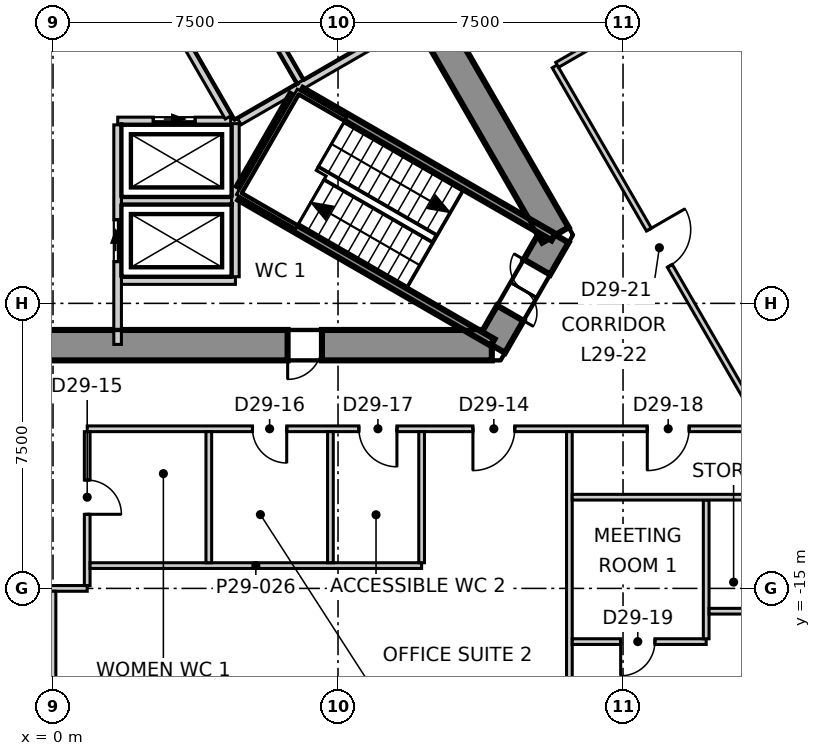
"""IFC4 building model, lengths in metres.
Left out: names, types, materials, properties, quantities, classifications, styles, units other than length and angle.
Written with IfcOpenShell. Run it as: python <this file> out.ifc"""

import sys

from ifc_helpers import new_model, si_unit, direction, frame, frame_2d, origin, place, context, subcontext, project, spatial, polyline, rectangle, outline, extrude, element, fill, save


model = new_model("IFC4")
c1 = context("Model", 3, precision=1e-05, world=origin(), true_north=direction((0.0, 1.0)))
c2 = subcontext(c1, "Body", "Model", "MODEL_VIEW")
j1 = project(units=[si_unit("LENGTHUNIT", "METRE"), si_unit("PLANEANGLEUNIT", "RADIAN")], contexts=[c1])
p1 = place(None, origin())
s1 = spatial("IfcSite", under=j1, at=p1, CompositionType="ELEMENT")
p2 = place(p1, origin())
s2 = spatial("IfcBuilding", under=s1, at=p2, CompositionType="ELEMENT")
p3 = place(p2, frame((0.0, 0.0, 128.3)))
s3 = spatial("IfcBuildingStorey", under=s2, at=p3, CompositionType="ELEMENT", Elevation=128.3)
p4 = place(p3, frame((-11.547, -8.6, -0.3), z_axis=(0.0, 0.0, 1.0), x_axis=(1.0, 0.0, 0.0)))
e1 = element("IfcWall", 1, at=p4, inside=s3, PredefinedType="SHEAR", context=c2, shape_type="SweptSolid", body=[
    extrude(outline(polyline([(-0.231, -0.4), (1.732, -0.4), (3.695, -0.4), (5.658, -0.4), (7.621, -0.4), (9.584, -0.4), (11.547, -0.4), (13.51, -0.4), (15.473, -0.4), (17.436, -0.4), (19.399, -0.4), (21.362, -0.4), (23.325, -0.4), (22.863, 0.4), (20.977, 0.4), (19.091, 0.4), (17.205, 0.4), (15.319, 0.4), (13.433, 0.4), (11.547, 0.4), (9.661, 0.4), (7.775, 0.4), (5.889, 0.4), (4.003, 0.4), (2.117, 0.4), (0.231, 0.4), (-0.231, -0.4)])), origin(), (0.0, 0.0, 1.0), 4.0),
])
p5 = place(p4, frame((3.951, 0.0, 0.3)))
e2 = element("IfcOpeningElement", 2, at=p5, cuts=e1, PredefinedType="OPENING", context=c2, shape_type="SweptSolid", body=[
    extrude(rectangle(XDim=1.0, YDim=2.1, at=frame_2d((0.5, 1.05))), frame((0.0, 0.41, 0.0), z_axis=(0.0, -1.0, 0.0), x_axis=(1.0, 0.0, 0.0)), (0.0, 0.0, 1.0), 0.82),
])
p6 = place(p4, frame((17.722, 0.0, 0.3)))
e3 = element("IfcOpeningElement", 3, at=p6, cuts=e1, PredefinedType="OPENING", context=c2, shape_type="SweptSolid", body=[
    extrude(rectangle(XDim=0.9, YDim=2.1, at=frame_2d((0.45, 1.05))), frame((0.0, 0.41, 0.0), z_axis=(0.0, -1.0, 0.0), x_axis=(1.0, 0.0, 0.0)), (0.0, 0.0, 1.0), 0.82),
])
p7 = place(p3, frame((11.547, -8.6, -0.3), z_axis=(0.0, 0.0, 1.0), x_axis=(0.49987182685, 0.866099391942, 0.0)))
e4 = element("IfcWall", 4, at=p7, inside=s3, PredefinedType="SHEAR", context=c2, shape_type="SweptSolid", body=[
    extrude(outline(polyline([(-0.231, -0.4), (1.674, -0.4), (3.579, -0.4), (3.118, 0.4), (1.674, 0.4), (0.231, 0.4), (-0.231, -0.4)])), origin(), (0.0, 0.0, 1.0), 4.0),
])
p8 = place(p7, frame((0.974, 0.0, 0.3)))
e5 = element("IfcOpeningElement", 5, at=p8, cuts=e4, PredefinedType="OPENING", context=c2, shape_type="SweptSolid", body=[
    extrude(rectangle(XDim=1.4, YDim=2.1, at=frame_2d((0.7, 1.05))), frame((0.0, 0.41, 0.0), z_axis=(0.0, -1.0, 0.0), x_axis=(1.0, 0.0, 0.0)), (0.0, 0.0, 1.0), 0.82),
])
p9 = place(p3, frame((13.221, -5.7, -0.3), z_axis=(0.0, 0.0, 1.0), x_axis=(-0.499995765644, 0.866027848477, 0.0)))
e6 = element("IfcWall", 6, at=p9, inside=s3, PredefinedType="SHEAR", context=c2, shape_type="SweptSolid", body=[
    extrude(outline(polyline([(-0.231, -0.4), (1.732, -0.4), (3.695, -0.4), (5.658, -0.4), (7.621, -0.4), (9.584, -0.4), (11.547, -0.4), (13.51, -0.4), (15.473, -0.4), (17.436, -0.4), (19.399, -0.4), (21.362, -0.4), (23.325, -0.4), (22.863, 0.4), (20.977, 0.4), (19.091, 0.4), (17.205, 0.4), (15.319, 0.4), (13.433, 0.4), (11.547, 0.4), (9.661, 0.4), (7.775, 0.4), (5.889, 0.4), (4.003, 0.4), (2.117, 0.4), (0.231, 0.4), (-0.231, -0.4)])), origin(), (0.0, 0.0, 1.0), 4.0),
])
p10 = place(p9, frame((10.647, 0.0, 0.3)))
e7 = element("IfcOpeningElement", 7, at=p10, cuts=e6, PredefinedType="OPENING", context=c2, shape_type="SweptSolid", body=[
    extrude(rectangle(XDim=1.8, YDim=2.1, at=frame_2d((0.9, 1.05))), frame((0.0, 0.41, 0.0), z_axis=(0.0, -1.0, 0.0), x_axis=(1.0, 0.0, 0.0)), (0.0, 0.0, 1.0), 0.82),
])
p11 = place(p9, frame((17.721, 0.0, 0.3)))
e8 = element("IfcOpeningElement", 8, at=p11, cuts=e6, PredefinedType="OPENING", context=c2, shape_type="SweptSolid", body=[
    extrude(rectangle(XDim=0.9, YDim=2.1, at=frame_2d((0.45, 1.05))), frame((0.0, 0.41, 0.0), z_axis=(0.0, -1.0, 0.0), x_axis=(1.0, 0.0, 0.0)), (0.0, 0.0, 1.0), 0.82),
])
p12 = place(p3, frame((31.588, -14.647, 0.0), z_axis=(0.0, 0.0, 1.0), x_axis=(-0.500005036527, 0.866022495925, 0.0)))
e9 = element("IfcWall", 9, at=p12, inside=s3, PredefinedType="ELEMENTEDWALL", context=c2, shape_type="SweptSolid", body=[
    extrude(rectangle(XDim=56.938, YDim=0.2, at=frame_2d((28.469, 0.0))), origin(), (0.0, 0.0, 1.0), 3.7),
])
p13 = place(p12, frame((2.25, 0.0, 0.9)))
e10 = element("IfcOpeningElement", 10, at=p13, cuts=e9, PredefinedType="OPENING", context=c2, shape_type="SweptSolid", body=[
    extrude(rectangle(XDim=4.9, YDim=2.5, at=frame_2d((2.45, 1.25))), frame((0.0, 0.11, 0.0), z_axis=(0.0, -1.0, 0.0), x_axis=(1.0, 0.0, 0.0)), (0.0, 0.0, 1.0), 0.22),
])
p14 = place(p12, frame((9.044, 0.0, 0.9)))
e11 = element("IfcOpeningElement", 11, at=p14, cuts=e9, PredefinedType="OPENING", context=c2, shape_type="SweptSolid", body=[
    extrude(rectangle(XDim=4.9, YDim=2.5, at=frame_2d((2.45, 1.25))), frame((0.0, 0.11, 0.0), z_axis=(0.0, -1.0, 0.0), x_axis=(1.0, 0.0, 0.0)), (0.0, 0.0, 1.0), 0.22),
])
p15 = place(p12, frame((15.838, 0.0, 0.9)))
e12 = element("IfcOpeningElement", 12, at=p15, cuts=e9, PredefinedType="OPENING", context=c2, shape_type="SweptSolid", body=[
    extrude(rectangle(XDim=4.9, YDim=2.5, at=frame_2d((2.45, 1.25))), frame((0.0, 0.11, 0.0), z_axis=(0.0, -1.0, 0.0), x_axis=(1.0, 0.0, 0.0)), (0.0, 0.0, 1.0), 0.22),
])
p16 = place(p12, frame((22.632, 0.0, 0.9)))
e13 = element("IfcOpeningElement", 13, at=p16, cuts=e9, PredefinedType="OPENING", context=c2, shape_type="SweptSolid", body=[
    extrude(rectangle(XDim=4.9, YDim=2.5, at=frame_2d((2.45, 1.25))), frame((0.0, 0.11, 0.0), z_axis=(0.0, -1.0, 0.0), x_axis=(1.0, 0.0, 0.0)), (0.0, 0.0, 1.0), 0.22),
])
p17 = place(p12, frame((29.426, 0.0, 0.9)))
e14 = element("IfcOpeningElement", 14, at=p17, cuts=e9, PredefinedType="OPENING", context=c2, shape_type="SweptSolid", body=[
    extrude(rectangle(XDim=4.9, YDim=2.5, at=frame_2d((2.45, 1.25))), frame((0.0, 0.11, 0.0), z_axis=(0.0, -1.0, 0.0), x_axis=(1.0, 0.0, 0.0)), (0.0, 0.0, 1.0), 0.22),
])
p18 = place(p12, frame((36.22, 0.0, 0.9)))
e15 = element("IfcOpeningElement", 15, at=p18, cuts=e9, PredefinedType="OPENING", context=c2, shape_type="SweptSolid", body=[
    extrude(rectangle(XDim=4.9, YDim=2.5, at=frame_2d((2.45, 1.25))), frame((0.0, 0.11, 0.0), z_axis=(0.0, -1.0, 0.0), x_axis=(1.0, 0.0, 0.0)), (0.0, 0.0, 1.0), 0.22),
])
p19 = place(p12, frame((43.014, 0.0, 0.9)))
e16 = element("IfcOpeningElement", 16, at=p19, cuts=e9, PredefinedType="OPENING", context=c2, shape_type="SweptSolid", body=[
    extrude(rectangle(XDim=4.9, YDim=2.5, at=frame_2d((2.45, 1.25))), frame((0.0, 0.11, 0.0), z_axis=(0.0, -1.0, 0.0), x_axis=(1.0, 0.0, 0.0)), (0.0, 0.0, 1.0), 0.22),
])
p20 = place(p12, frame((49.808, 0.0, 0.9)))
e17 = element("IfcOpeningElement", 17, at=p20, cuts=e9, PredefinedType="OPENING", context=c2, shape_type="SweptSolid", body=[
    extrude(rectangle(XDim=4.9, YDim=2.5, at=frame_2d((2.45, 1.25))), frame((0.0, 0.11, 0.0), z_axis=(0.0, -1.0, 0.0), x_axis=(1.0, 0.0, 0.0)), (0.0, 0.0, 1.0), 0.22),
])
p21 = place(p3, frame((0.901, -10.8, 0.0), z_axis=(0.0, 0.0, 1.0), x_axis=(1.0, 0.0, 0.0)))
e18 = element("IfcWall", 18, at=p21, inside=s3, PredefinedType="PARTITIONING", context=c2, shape_type="SweptSolid", body=[
    extrude(rectangle(XDim=17.805, YDim=0.15, at=frame_2d((8.903, 0.0))), origin(), (0.0, 0.0, 1.0), 3.7),
])
p22 = place(p21, frame((10.149, 0.0, 0.0)))
e19 = element("IfcOpeningElement", 19, at=p22, cuts=e18, PredefinedType="OPENING", context=c2, shape_type="SweptSolid", body=[
    extrude(rectangle(XDim=1.1, YDim=2.1, at=frame_2d((0.55, 1.05))), frame((0.0, 0.085, 0.0), z_axis=(0.0, -1.0, 0.0), x_axis=(1.0, 0.0, 0.0)), (0.0, 0.0, 1.0), 0.17),
])
p23 = place(p21, frame((4.349, 0.0, 0.0)))
e20 = element("IfcOpeningElement", 20, at=p23, cuts=e18, PredefinedType="OPENING", context=c2, shape_type="SweptSolid", body=[
    extrude(rectangle(XDim=0.9, YDim=2.1, at=frame_2d((0.45, 1.05))), frame((0.0, 0.085, 0.0), z_axis=(0.0, -1.0, 0.0), x_axis=(1.0, 0.0, 0.0)), (0.0, 0.0, 1.0), 0.17),
])
p24 = place(p21, frame((7.149, 0.0, 0.0)))
e21 = element("IfcOpeningElement", 21, at=p24, cuts=e18, PredefinedType="OPENING", context=c2, shape_type="SweptSolid", body=[
    extrude(rectangle(XDim=1.0, YDim=2.1, at=frame_2d((0.5, 1.05))), frame((0.0, 0.085, 0.0), z_axis=(0.0, -1.0, 0.0), x_axis=(1.0, 0.0, 0.0)), (0.0, 0.0, 1.0), 0.17),
])
p25 = place(p21, frame((14.737, 0.0, 0.0)))
e22 = element("IfcOpeningElement", 22, at=p25, cuts=e18, PredefinedType="OPENING", context=c2, shape_type="SweptSolid", body=[
    extrude(rectangle(XDim=1.1, YDim=2.1, at=frame_2d((0.55, 1.05))), frame((0.0, 0.085, 0.0), z_axis=(0.0, -1.0, 0.0), x_axis=(1.0, 0.0, 0.0)), (0.0, 0.0, 1.0), 0.17),
])
p26 = place(p3, frame((-0.9, -15.0, 0.0), z_axis=(0.0, 0.0, 1.0), x_axis=(1.0, 0.0, 0.0)))
e23 = element("IfcWall", 23, at=p26, inside=s3, PredefinedType="PARTITIONING", context=c2, shape_type="SweptSolid", body=[
    extrude(rectangle(XDim=1.8, YDim=0.15, at=frame_2d((0.9, 0.0))), origin(), (0.0, 0.0, 1.0), 3.7),
])
p27 = place(p3, frame((0.0, -19.952, 0.0), z_axis=(0.0, 0.0, 1.0), x_axis=(0.0, 1.0, 0.0)))
e24 = element("IfcWall", 24, at=p27, inside=s3, PredefinedType="PARTITIONING", context=c2, shape_type="SweptSolid", body=[
    extrude(rectangle(XDim=4.877, YDim=0.15, at=frame_2d((2.438, 0.0))), origin(), (0.0, 0.0, 1.0), 3.2),
])
p28 = place(p3, frame((0.9, -14.925, 0.0), z_axis=(0.0, 0.0, 1.0), x_axis=(0.0, 1.0, 0.0)))
e25 = element("IfcWall", 25, at=p28, inside=s3, PredefinedType="PARTITIONING", context=c2, shape_type="SweptSolid", body=[
    extrude(rectangle(XDim=4.049, YDim=0.15, at=frame_2d((2.024, 0.0))), origin(), (0.0, 0.0, 1.0), 3.7),
])
p29 = place(p28, frame((1.875, 0.0, 0.0)))
e26 = element("IfcOpeningElement", 26, at=p29, cuts=e25, PredefinedType="OPENING", context=c2, shape_type="SweptSolid", body=[
    extrude(rectangle(XDim=0.9, YDim=2.1, at=frame_2d((0.45, 1.05))), frame((0.0, 0.085, 0.0), z_axis=(0.0, -1.0, 0.0), x_axis=(1.0, 0.0, 0.0)), (0.0, 0.0, 1.0), 0.17),
])
p30 = place(p3, frame((13.201, -1.264, 0.0), z_axis=(0.0, 0.0, 1.0), x_axis=(0.499973466559, -0.866040722332, 0.0)))
e27 = element("IfcWall", 27, at=p30, inside=s3, PredefinedType="PARTITIONING", context=c2, shape_type="SweptSolid", body=[
    extrude(rectangle(XDim=10.861, YDim=0.15, at=frame_2d((5.43, 0.0))), origin(), (0.0, 0.0, 1.0), 3.7),
])
p31 = place(p30, frame((4.96, 0.0, 0.0)))
e28 = element("IfcOpeningElement", 28, at=p31, cuts=e27, PredefinedType="OPENING", context=c2, shape_type="SweptSolid", body=[
    extrude(rectangle(XDim=1.1, YDim=2.1, at=frame_2d((0.55, 1.05))), frame((0.0, 0.085, 0.0), z_axis=(0.0, -1.0, 0.0), x_axis=(1.0, 0.0, 0.0)), (0.0, 0.0, 1.0), 0.17),
])
p32 = place(p3, frame((0.975, -14.4, 0.0), z_axis=(0.0, 0.0, 1.0), x_axis=(1.0, 0.0, 0.0)))
e29 = element("IfcWall", 29, at=p32, inside=s3, PredefinedType="PARTITIONING", context=c2, shape_type="SweptSolid", body=[
    extrude(rectangle(XDim=8.725, YDim=0.15, at=frame_2d((4.362, 0.0))), origin(), (0.0, 0.0, 1.0), 3.7),
])
for number, where, z_axis, x_axis in (
    (30, (4.1, -14.325, 0.0), (0.0, 0.0, 1.0), (0.0, 1.0, 0.0)),
    (31, (9.7, -14.325, 0.0), (0.0, 0.0, 1.0), (0.0, 1.0, 0.0)),
    (32, (7.3, -14.325, 0.0), (0.0, 0.0, 1.0), (0.0, 1.0, 0.0)),
):
    element("IfcWall", number, at=place(p3, frame(where, z_axis=z_axis, x_axis=x_axis)), inside=s3, PredefinedType="PARTITIONING", context=c2, shape_type="SweptSolid", body=[
        extrude(rectangle(XDim=3.45, YDim=0.15, at=frame_2d((1.725, 0.0))), origin(), (0.0, 0.0, 1.0), 3.7),
    ])
p33 = place(p3, frame((13.588, -19.952, 0.0), z_axis=(0.0, 0.0, 1.0), x_axis=(0.0, 1.0, 0.0)))
e33 = element("IfcWall", 33, at=p33, inside=s3, PredefinedType="PARTITIONING", context=c2, shape_type="SweptSolid", body=[
    extrude(rectangle(XDim=9.077, YDim=0.15, at=frame_2d((4.539, 0.0))), origin(), (0.0, 0.0, 1.0), 3.7),
])
p34 = place(p3, frame((13.266, -1.225, 0.0), z_axis=(0.0, 0.0, 1.0), x_axis=(0.866079163253, 0.499906874306, 0.0)))
e34 = element("IfcWall", 34, at=p34, inside=s3, PredefinedType="PARTITIONING", context=c2, shape_type="SweptSolid", body=[
    extrude(rectangle(XDim=4.049, YDim=0.15, at=frame_2d((2.024, 0.0))), origin(), (0.0, 0.0, 1.0), 3.7),
])
p35 = place(p3, frame((13.663, -16.4, 0.0), z_axis=(0.0, 0.0, 1.0), x_axis=(1.0, 0.0, 0.0)))
e35 = element("IfcWall", 35, at=p35, inside=s3, PredefinedType="PARTITIONING", context=c2, shape_type="SweptSolid", body=[
    extrude(rectangle(XDim=3.525, YDim=0.15, at=frame_2d((1.762, 0.0))), origin(), (0.0, 0.0, 1.0), 3.7),
])
p36 = place(p35, frame((1.275, 0.0, 0.0)))
e36 = element("IfcOpeningElement", 36, at=p36, cuts=e35, PredefinedType="OPENING", context=c2, shape_type="SweptSolid", body=[
    extrude(rectangle(XDim=0.9, YDim=2.1, at=frame_2d((0.45, 1.05))), frame((0.0, 0.085, 0.0), z_axis=(0.0, -1.0, 0.0), x_axis=(1.0, 0.0, 0.0)), (0.0, 0.0, 1.0), 0.17),
])
p37 = place(p3, frame((17.188, -16.325, 0.0), z_axis=(0.0, 0.0, 1.0), x_axis=(0.0, 1.0, 0.0)))
e37 = element("IfcWall", 37, at=p37, inside=s3, PredefinedType="PARTITIONING", context=c2, shape_type="SweptSolid", body=[
    extrude(rectangle(XDim=3.65, YDim=0.15, at=frame_2d((1.825, 0.0))), origin(), (0.0, 0.0, 1.0), 3.7),
])
p38 = place(p3, frame((13.663, -12.6, 0.0), z_axis=(0.0, 0.0, 1.0), x_axis=(1.0, 0.0, 0.0)))
e38 = element("IfcWall", 38, at=p38, inside=s3, PredefinedType="PARTITIONING", context=c2, shape_type="SweptSolid", body=[
    extrude(rectangle(XDim=5.725, YDim=0.15, at=frame_2d((2.862, 0.0))), origin(), (0.0, 0.0, 1.0), 3.7),
])
p39 = place(p3, frame((17.263, -15.6, 0.0), z_axis=(0.0, 0.0, 1.0), x_axis=(1.0, 0.0, 0.0)))
e39 = element("IfcWall", 39, at=p39, inside=s3, PredefinedType="PARTITIONING", context=c2, shape_type="SweptSolid", body=[
    extrude(rectangle(XDim=2.125, YDim=0.15, at=frame_2d((1.062, 0.0))), origin(), (0.0, 0.0, 1.0), 3.7),
])
p40 = place(p3, frame((1.8, -6.9, 0.0), z_axis=(0.0, 0.0, 1.0), x_axis=(1.0, 0.0, 0.0)))
e40 = element("IfcWall", 40, at=p40, inside=s3, PredefinedType="SOLIDWALL", context=c2, shape_type="SweptSolid", body=[
    extrude(rectangle(XDim=3.0, YDim=0.2, at=frame_2d((1.5, 0.0))), origin(), (0.0, 0.0, 1.0), 3.7),
])
p41 = place(p3, frame((1.8, -4.8, 0.0), z_axis=(0.0, 0.0, 1.0), x_axis=(1.0, 0.0, 0.0)))
e41 = element("IfcWall", 41, at=p41, inside=s3, PredefinedType="SOLIDWALL", context=c2, shape_type="SweptSolid", body=[
    extrude(rectangle(XDim=2.9, YDim=0.2, at=frame_2d((1.45, 0.0))), origin(), (0.0, 0.0, 1.0), 3.7),
])
p42 = place(p3, frame((1.703, -2.7, 0.0), z_axis=(0.0, 0.0, 1.0), x_axis=(1.0, 0.0, 0.0)))
e42 = element("IfcWall", 42, at=p42, inside=s3, PredefinedType="SOLIDWALL", context=c2, shape_type="SweptSolid", body=[
    extrude(rectangle(XDim=2.973, YDim=0.2, at=frame_2d((1.487, 0.0))), origin(), (0.0, 0.0, 1.0), 3.7),
])
p43 = place(p42, frame((0.936, 0.0, 0.0)))
e43 = element("IfcOpeningElement", 43, at=p43, cuts=e42, PredefinedType="OPENING", context=c2, shape_type="SweptSolid", body=[
    extrude(rectangle(XDim=1.1, YDim=2.1, at=frame_2d((0.55, 1.05))), frame((0.0, 0.11, 0.0), z_axis=(0.0, -1.0, 0.0), x_axis=(1.0, 0.0, 0.0)), (0.0, 0.0, 1.0), 0.22),
])
p44 = place(p3, frame((3.19, -0.125, 0.0), z_axis=(0.0, 0.0, 1.0), x_axis=(0.499988658015, -0.866031951983, 0.0)))
e44 = element("IfcWall", 44, at=p44, inside=s3, PredefinedType="SOLIDWALL", context=c2, shape_type="SweptSolid", body=[
    extrude(rectangle(XDim=2.858, YDim=0.2, at=frame_2d((1.429, 0.0))), origin(), (0.0, 0.0, 1.0), 3.7),
])
p45 = place(p3, frame((1.7, -8.58, 0.0), z_axis=(0.0, 0.0, 1.0), x_axis=(0.0, 1.0, 0.0)))
e45 = element("IfcWall", 45, at=p45, inside=s3, PredefinedType="SOLIDWALL", context=c2, shape_type="SweptSolid", body=[
    extrude(rectangle(XDim=5.777, YDim=0.2, at=frame_2d((2.889, 0.0))), origin(), (0.0, 0.0, 1.0), 3.7),
])
p46 = place(p45, frame((2.18, 0.0, 0.0)))
e46 = element("IfcOpeningElement", 46, at=p46, cuts=e45, PredefinedType="OPENING", context=c2, shape_type="SweptSolid", body=[
    extrude(rectangle(XDim=1.1, YDim=2.1, at=frame_2d((0.55, 1.05))), frame((0.0, 0.11, 0.0), z_axis=(0.0, -1.0, 0.0), x_axis=(1.0, 0.0, 0.0)), (0.0, 0.0, 1.0), 0.22),
])
p47 = place(p3, frame((4.8, -6.8, 0.0), z_axis=(0.0, 0.0, 1.0), x_axis=(0.0, 1.0, 0.0)))
e47 = element("IfcWall", 47, at=p47, inside=s3, PredefinedType="SOLIDWALL", context=c2, shape_type="SweptSolid", body=[
    extrude(rectangle(XDim=4.029, YDim=0.2, at=frame_2d((2.015, 0.0))), origin(), (0.0, 0.0, 1.0), 3.7),
])
p48 = place(p3, frame((5.057, 0.841, 0.0), z_axis=(0.0, 0.0, 1.0), x_axis=(0.50012328804, -0.865954211699, 0.0)))
e48 = element("IfcWall", 48, at=p48, inside=s3, PredefinedType="SOLIDWALL", context=c2, shape_type="SweptSolid", body=[
    extrude(rectangle(XDim=2.9, YDim=0.2, at=frame_2d((1.45, 0.0))), origin(), (0.0, 0.0, 1.0), 3.7),
])
p49 = place(p3, frame((4.9, -2.714, 0.0), z_axis=(0.0, 0.0, 1.0), x_axis=(0.865992350556, 0.500057245502, 0.0)))
e49 = element("IfcWall", 49, at=p49, inside=s3, PredefinedType="SOLIDWALL", context=c2, shape_type="SweptSolid", body=[
    extrude(rectangle(XDim=3.914, YDim=0.2, at=frame_2d((1.957, 0.0))), origin(), (0.0, 0.0, 1.0), 3.7),
])
p50 = place(p3, frame((4.929, -4.693, 0.0), z_axis=(0.0, 0.0, 1.0), x_axis=(0.866005769735, -0.50003400563, 0.0)))
e50 = element("IfcWall", 50, at=p50, inside=s3, PredefinedType="SOLIDWALL", context=c2, shape_type="SweptSolid", body=[
    extrude(rectangle(XDim=7.665, YDim=0.2, at=frame_2d((3.833, 0.0))), origin(), (0.0, 0.0, 1.0), 3.7),
])
p51 = place(p3, frame((4.929, -4.462, 0.0), z_axis=(0.0, 0.0, 1.0), x_axis=(0.500200581029, 0.865909567298, 0.0)))
e51 = element("IfcWall", 51, at=p51, inside=s3, PredefinedType="SOLIDWALL", context=c2, shape_type="SweptSolid", body=[
    extrude(rectangle(XDim=2.799, YDim=0.2, at=frame_2d((1.399, 0.0))), origin(), (0.0, 0.0, 1.0), 3.7),
])
p52 = place(p3, frame((6.529, -1.922, 0.0), z_axis=(0.0, 0.0, 1.0), x_axis=(0.866060938598, -0.499938446846, 0.0)))
e52 = element("IfcWall", 52, at=p52, inside=s3, PredefinedType="SOLIDWALL", context=c2, shape_type="SweptSolid", body=[
    extrude(rectangle(XDim=7.665, YDim=0.2, at=frame_2d((3.832, 0.0))), origin(), (0.0, 0.0, 1.0), 3.7),
])
p53 = place(p43, origin())
e53 = element("IfcDoor", 53, at=p53, inside=s3, OperationType="SLIDING_TO_LEFT", PredefinedType="DOOR", context=c2, shape_type="SweptSolid", body=[
    extrude(rectangle(XDim=1.1, YDim=2.1, at=frame_2d((0.55, 1.05))), frame((0.0, 0.025, 0.0), z_axis=(0.0, -1.0, 0.0), x_axis=(1.0, 0.0, 0.0)), (0.0, 0.0, 1.0), 0.05),
])
fill(e43, e53)
p54 = place(p46, origin())
e54 = element("IfcDoor", 54, at=p54, inside=s3, OperationType="SLIDING_TO_LEFT", PredefinedType="DOOR", context=c2, shape_type="SweptSolid", body=[
    extrude(rectangle(XDim=1.1, YDim=2.1, at=frame_2d((0.55, 1.05))), frame((0.0, 0.025, 0.0), z_axis=(0.0, -1.0, 0.0), x_axis=(1.0, 0.0, 0.0)), (0.0, 0.0, 1.0), 0.05),
])
fill(e46, e54)
p55 = place(p22, origin())
e55 = element("IfcDoor", 55, at=p55, inside=s3, OperationType="SINGLE_SWING_LEFT", PredefinedType="DOOR", context=c2, shape_type="SweptSolid", body=[
    extrude(rectangle(XDim=1.1, YDim=2.1, at=frame_2d((0.55, 1.05))), frame((0.0, 0.025, 0.0), z_axis=(0.0, -1.0, 0.0), x_axis=(1.0, 0.0, 0.0)), (0.0, 0.0, 1.0), 0.05),
])
fill(e19, e55)
p56 = place(p29, origin())
e56 = element("IfcDoor", 56, at=p56, inside=s3, OperationType="SINGLE_SWING_LEFT", PredefinedType="DOOR", context=c2, shape_type="SweptSolid", body=[
    extrude(rectangle(XDim=0.9, YDim=2.1, at=frame_2d((0.45, 1.05))), frame((0.0, 0.025, 0.0), z_axis=(0.0, -1.0, 0.0), x_axis=(1.0, 0.0, 0.0)), (0.0, 0.0, 1.0), 0.05),
])
fill(e26, e56)
p57 = place(p23, origin())
e57 = element("IfcDoor", 57, at=p57, inside=s3, OperationType="SINGLE_SWING_RIGHT", PredefinedType="DOOR", context=c2, shape_type="SweptSolid", body=[
    extrude(rectangle(XDim=0.9, YDim=2.1, at=frame_2d((0.45, 1.05))), frame((0.0, 0.025, 0.0), z_axis=(0.0, -1.0, 0.0), x_axis=(1.0, 0.0, 0.0)), (0.0, 0.0, 1.0), 0.05),
])
fill(e20, e57)
p58 = place(p24, origin())
e58 = element("IfcDoor", 58, at=p58, inside=s3, OperationType="SINGLE_SWING_RIGHT", PredefinedType="DOOR", context=c2, shape_type="SweptSolid", body=[
    extrude(rectangle(XDim=1.0, YDim=2.1, at=frame_2d((0.5, 1.05))), frame((0.0, 0.025, 0.0), z_axis=(0.0, -1.0, 0.0), x_axis=(1.0, 0.0, 0.0)), (0.0, 0.0, 1.0), 0.05),
])
fill(e21, e58)
p59 = place(p25, origin())
e59 = element("IfcDoor", 59, at=p59, inside=s3, OperationType="SINGLE_SWING_LEFT", PredefinedType="DOOR", context=c2, shape_type="SweptSolid", body=[
    extrude(rectangle(XDim=1.1, YDim=2.1, at=frame_2d((0.55, 1.05))), frame((0.0, 0.025, 0.0), z_axis=(0.0, -1.0, 0.0), x_axis=(1.0, 0.0, 0.0)), (0.0, 0.0, 1.0), 0.05),
])
fill(e22, e59)
p60 = place(p36, origin())
e60 = element("IfcDoor", 60, at=p60, inside=s3, OperationType="SINGLE_SWING_LEFT", PredefinedType="DOOR", context=c2, shape_type="SweptSolid", body=[
    extrude(rectangle(XDim=0.9, YDim=2.1, at=frame_2d((0.45, 1.05))), frame((0.0, 0.025, 0.0), z_axis=(0.0, -1.0, 0.0), x_axis=(1.0, 0.0, 0.0)), (0.0, 0.0, 1.0), 0.05),
])
fill(e36, e60)
p61 = place(p31, origin())
e61 = element("IfcDoor", 61, at=p61, inside=s3, OperationType="SINGLE_SWING_RIGHT", PredefinedType="DOOR", context=c2, shape_type="SweptSolid", body=[
    extrude(rectangle(XDim=1.1, YDim=2.1, at=frame_2d((0.55, 1.05))), frame((0.0, 0.025, 0.0), z_axis=(0.0, -1.0, 0.0), x_axis=(1.0, 0.0, 0.0)), (0.0, 0.0, 1.0), 0.05),
])
fill(e28, e61)
p62 = place(p8, origin())
e62 = element("IfcDoor", 62, at=p62, inside=s3, OperationType="DOUBLE_DOOR_SINGLE_SWING", PredefinedType="DOOR", context=c2, shape_type="SweptSolid", body=[
    extrude(rectangle(XDim=1.4, YDim=2.1, at=frame_2d((0.7, 1.05))), frame((0.0, 0.025, 0.0), z_axis=(0.0, -1.0, 0.0), x_axis=(1.0, 0.0, 0.0)), (0.0, 0.0, 1.0), 0.05),
])
fill(e5, e62)
p63 = place(p6, origin())
e63 = element("IfcDoor", 63, at=p63, inside=s3, OperationType="SINGLE_SWING_LEFT", PredefinedType="DOOR", context=c2, shape_type="SweptSolid", body=[
    extrude(rectangle(XDim=0.9, YDim=2.1, at=frame_2d((0.45, 1.05))), frame((0.0, 0.125, 0.0), z_axis=(0.0, -1.0, 0.0), x_axis=(1.0, 0.0, 0.0)), (0.0, 0.0, 1.0), 0.05),
])
fill(e3, e63)
save(model, sys.argv[1])
